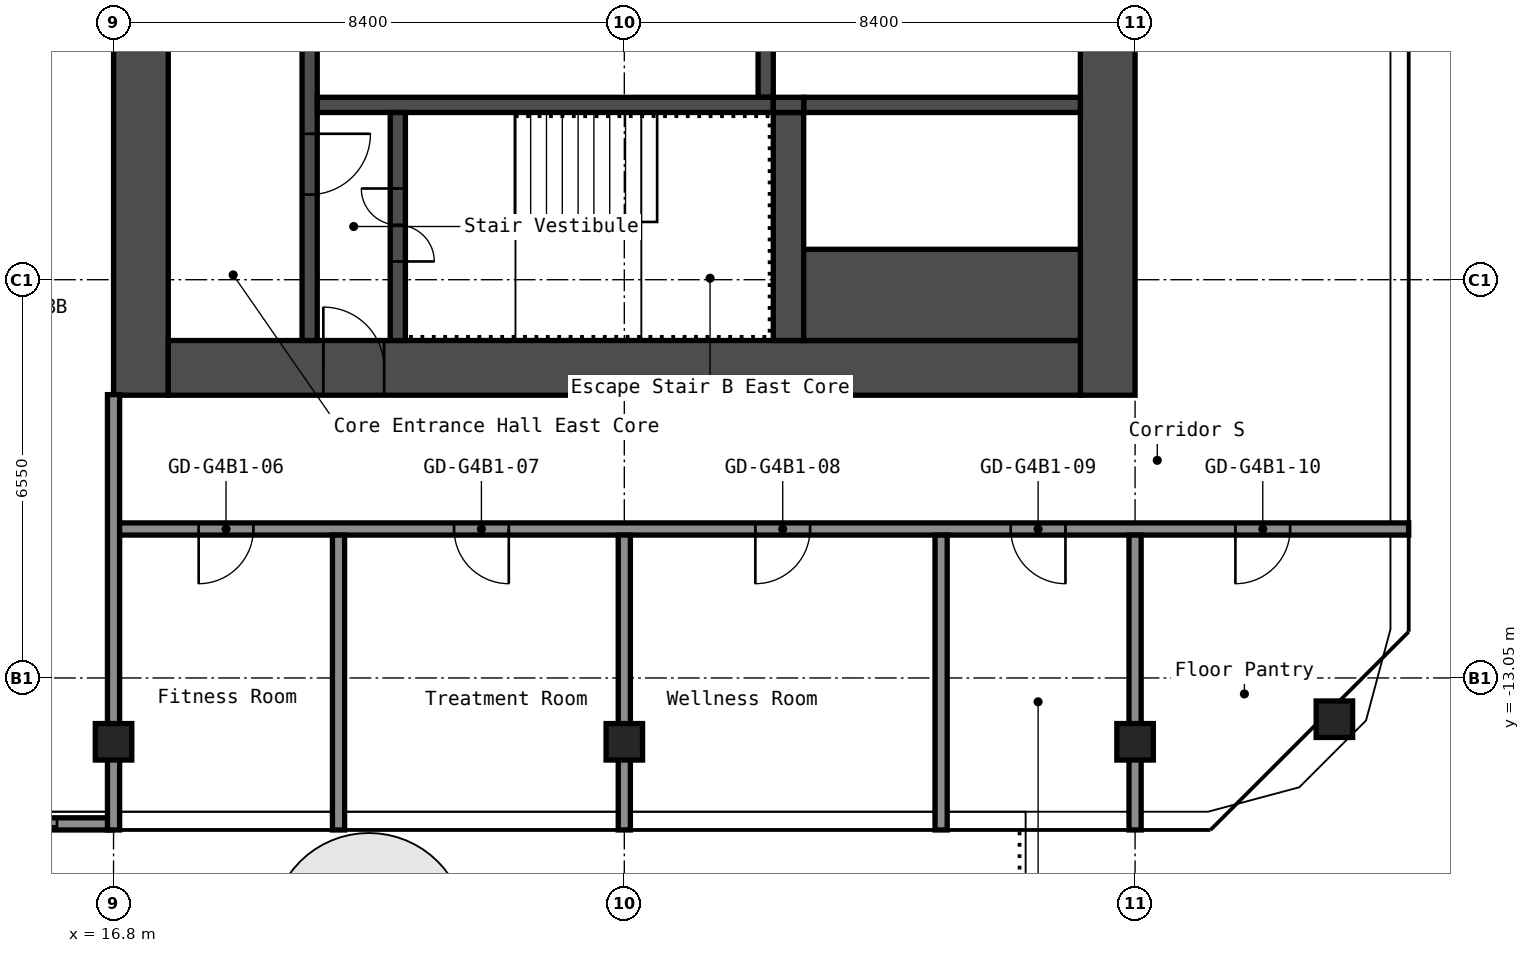
"""IFC4 building model, lengths in metres.
Left out: names, types, materials, properties, quantities, classifications, styles, units other than length and angle.
Written with IfcOpenShell. Run it as: python <this file> out.ifc"""

import sys

from ifc_helpers import new_model, si_unit, direction, frame, frame_2d, origin, origin_2d, place, context, subcontext, project, spatial, rectangle, hollow_rectangle, extrude, element, fill, save


model = new_model("IFC4")
c1 = context("Model", 3, precision=1e-05, world=origin(), true_north=direction((0.0, 1.0)))
c2 = subcontext(c1, "Body", "Model", "MODEL_VIEW")
j1 = project(units=[si_unit("LENGTHUNIT", "METRE"), si_unit("PLANEANGLEUNIT", "RADIAN")], contexts=[c1])
p1 = place(None, origin())
s1 = spatial("IfcSite", under=j1, at=p1, CompositionType="ELEMENT")
p2 = place(p1, origin())
s2 = spatial("IfcBuilding", under=s1, at=p2, CompositionType="ELEMENT")
p3 = place(p2, frame((0.0, 0.0, 205.8)))
s3 = spatial("IfcBuildingStorey", under=s2, at=p3, CompositionType="ELEMENT", Elevation=205.8)
for number, where, z_axis, x_axis in (
    (1, (16.8, -14.1, 0.0), (0.0, 0.0, 1.0), (1.0, 0.0, 0.0)),
    (2, (25.2, -14.1, 0.0), (0.0, 0.0, 1.0), (1.0, 0.0, 0.0)),
    (3, (33.6, -14.1, 0.0), (0.0, 0.0, 1.0), (1.0, 0.0, 0.0)),
    (4, (36.878, -13.729, 0.0), (0.0, 0.0, 1.0), (1.0, 0.0, 0.0)),
):
    element("IfcColumn", number, at=place(p3, frame(where, z_axis=z_axis, x_axis=x_axis)), inside=s3, PredefinedType="COLUMN", context=c2, shape_type="SweptSolid", body=[
        extrude(hollow_rectangle(XDim=0.6, YDim=0.6, WallThickness=0.025, InnerFilletRadius=0.038, OuterFilletRadius=0.062, at=origin_2d()), origin(), (0.0, 0.0, 1.0), 2.75),
    ])
p4 = place(p3, frame((17.25, -8.4, 0.0), z_axis=(0.0, 0.0, 1.0), x_axis=(0.0, 1.0, 0.0)))
e5 = element("IfcWall", 5, at=p4, inside=s3, PredefinedType="SHEAR", context=c2, shape_type="SweptSolid", body=[
    extrude(rectangle(XDim=16.8, YDim=0.9, at=frame_2d((8.4, 0.0))), origin(), (0.0, 0.0, 1.0), 2.75),
])
p5 = place(p4, frame((10.1, 0.0, 0.0)))
e6 = element("IfcOpeningElement", 6, at=p5, cuts=e5, PredefinedType="OPENING", context=c2, shape_type="SweptSolid", body=[
    extrude(rectangle(XDim=1.6, YDim=2.1, at=frame_2d((0.8, 1.05))), frame((0.0, 0.46, 0.0), z_axis=(0.0, -1.0, 0.0), x_axis=(1.0, 0.0, 0.0)), (0.0, 0.0, 1.0), 0.92),
])
p6 = place(p3, frame((33.15, -8.4, 0.0), z_axis=(0.0, 0.0, 1.0), x_axis=(0.0, 1.0, 0.0)))
e7 = element("IfcWall", 7, at=p6, inside=s3, PredefinedType="SHEAR", context=c2, shape_type="SweptSolid", body=[
    extrude(rectangle(XDim=16.8, YDim=0.9, at=frame_2d((8.4, 0.0))), origin(), (0.0, 0.0, 1.0), 2.75),
])
p7 = place(p3, frame((17.7, -7.95, 0.0), z_axis=(0.0, 0.0, 1.0), x_axis=(1.0, 0.0, 0.0)))
e8 = element("IfcWall", 8, at=p7, inside=s3, PredefinedType="SHEAR", context=c2, shape_type="SweptSolid", body=[
    extrude(rectangle(XDim=15.0, YDim=0.9, at=frame_2d((7.5, 0.0))), origin(), (0.0, 0.0, 1.0), 2.75),
])
p8 = place(p7, frame((2.55, 0.0, 0.0)))
e9 = element("IfcOpeningElement", 9, at=p8, cuts=e8, PredefinedType="OPENING", context=c2, shape_type="SweptSolid", body=[
    extrude(rectangle(XDim=1.0, YDim=2.1, at=frame_2d((0.5, 1.05))), frame((0.0, 0.46, 0.0), z_axis=(0.0, -1.0, 0.0), x_axis=(1.0, 0.0, 0.0)), (0.0, 0.0, 1.0), 0.92),
])
p9 = place(p3, frame((20.025, -7.5, 0.0), z_axis=(0.0, 0.0, 1.0), x_axis=(0.0, 1.0, 0.0)))
e10 = element("IfcWall", 10, at=p9, inside=s3, PredefinedType="SHEAR", context=c2, shape_type="SweptSolid", body=[
    extrude(rectangle(XDim=6.3, YDim=0.25, at=frame_2d((3.15, 0.0))), origin(), (0.0, 0.0, 1.0), 2.75),
])
p10 = place(p9, frame((2.4, 0.0, 0.0)))
e11 = element("IfcOpeningElement", 11, at=p10, cuts=e10, PredefinedType="OPENING", context=c2, shape_type="SweptSolid", body=[
    extrude(rectangle(XDim=1.0, YDim=2.1, at=frame_2d((0.5, 1.05))), frame((0.0, 0.135, 0.0), z_axis=(0.0, -1.0, 0.0), x_axis=(1.0, 0.0, 0.0)), (0.0, 0.0, 1.0), 0.27),
])
p11 = place(p3, frame((27.525, -3.5, 0.0), z_axis=(0.0, 0.0, 1.0), x_axis=(0.0, 1.0, 0.0)))
e12 = element("IfcWall", 12, at=p11, inside=s3, PredefinedType="SHEAR", context=c2, shape_type="SweptSolid", body=[
    extrude(rectangle(XDim=2.05, YDim=0.25, at=frame_2d((1.025, 0.0))), origin(), (0.0, 0.0, 1.0), 2.75),
])
p12 = place(p3, frame((20.15, -3.625, 0.0), z_axis=(0.0, 0.0, 1.0), x_axis=(1.0, 0.0, 0.0)))
e13 = element("IfcWall", 13, at=p12, inside=s3, PredefinedType="SHEAR", context=c2, shape_type="SweptSolid", body=[
    extrude(rectangle(XDim=7.5, YDim=0.25, at=frame_2d((3.75, 0.0))), origin(), (0.0, 0.0, 1.0), 2.75),
])
p13 = place(p3, frame((21.475, -7.5, 0.0), z_axis=(0.0, 0.0, 1.0), x_axis=(0.0, 1.0, 0.0)))
e14 = element("IfcWall", 14, at=p13, inside=s3, PredefinedType="SHEAR", context=c2, shape_type="SweptSolid", body=[
    extrude(rectangle(XDim=3.75, YDim=0.25, at=frame_2d((1.875, 0.0))), origin(), (0.0, 0.0, 1.0), 2.75),
])
p14 = place(p13, frame((1.3, 0.0, 0.0)))
e15 = element("IfcOpeningElement", 15, at=p14, cuts=e14, PredefinedType="OPENING", context=c2, shape_type="SweptSolid", body=[
    extrude(rectangle(XDim=1.2, YDim=2.1, at=frame_2d((0.6, 1.05))), frame((0.0, 0.135, 0.0), z_axis=(0.0, -1.0, 0.0), x_axis=(1.0, 0.0, 0.0)), (0.0, 0.0, 1.0), 0.27),
])
p15 = place(p3, frame((27.9, -7.5, 0.0), z_axis=(0.0, 0.0, 1.0), x_axis=(0.0, 1.0, 0.0)))
e16 = element("IfcWall", 16, at=p15, inside=s3, PredefinedType="SHEAR", context=c2, shape_type="SweptSolid", body=[
    extrude(rectangle(XDim=3.75, YDim=0.5, at=frame_2d((1.875, 0.0))), origin(), (0.0, 0.0, 1.0), 2.75),
])
p16 = place(p3, frame((28.15, -3.625, 0.0), z_axis=(0.0, 0.0, 1.0), x_axis=(1.0, 0.0, 0.0)))
e17 = element("IfcWall", 17, at=p16, inside=s3, PredefinedType="SHEAR", context=c2, shape_type="SweptSolid", body=[
    extrude(rectangle(XDim=4.55, YDim=0.25, at=frame_2d((2.275, 0.0))), origin(), (0.0, 0.0, 1.0), 2.75),
])
p17 = place(p3, frame((28.15, -6.75, 0.0), z_axis=(0.0, 0.0, 1.0), x_axis=(1.0, 0.0, 0.0)))
e18 = element("IfcWall", 18, at=p17, inside=s3, PredefinedType="SHEAR", context=c2, shape_type="SweptSolid", body=[
    extrude(rectangle(XDim=4.55, YDim=1.5, at=frame_2d((2.275, 0.0))), origin(), (0.0, 0.0, 1.0), 2.75),
])
p18 = place(p3, frame((27.65, -3.625, 0.0), z_axis=(0.0, 0.0, 1.0), x_axis=(1.0, 0.0, 0.0)))
e19 = element("IfcWall", 19, at=p18, inside=s3, PredefinedType="SHEAR", context=c2, shape_type="SweptSolid", body=[
    extrude(rectangle(XDim=0.5, YDim=0.25, at=frame_2d((0.25, 0.0))), origin(), (0.0, 0.0, 1.0), 2.75),
])
p19 = place(p3, frame((16.8, -10.6, 0.0), z_axis=(0.0, 0.0, 1.0), x_axis=(1.0, 0.0, 0.0)))
e20 = element("IfcWall", 20, at=p19, inside=s3, PredefinedType="PARTITIONING", context=c2, shape_type="SweptSolid", body=[
    extrude(rectangle(XDim=21.3, YDim=0.2, at=frame_2d((10.65, 0.0))), origin(), (0.0, 0.0, 1.0), 2.75),
])
p20 = place(p19, frame((1.4, 0.0, 0.0)))
e21 = element("IfcOpeningElement", 21, at=p20, cuts=e20, PredefinedType="OPENING", context=c2, shape_type="SweptSolid", body=[
    extrude(rectangle(XDim=0.9, YDim=2.1, at=frame_2d((0.45, 1.05))), frame((0.0, 0.11, 0.0), z_axis=(0.0, -1.0, 0.0), x_axis=(1.0, 0.0, 0.0)), (0.0, 0.0, 1.0), 0.22),
])
p21 = place(p19, frame((5.6, 0.0, 0.0)))
e22 = element("IfcOpeningElement", 22, at=p21, cuts=e20, PredefinedType="OPENING", context=c2, shape_type="SweptSolid", body=[
    extrude(rectangle(XDim=0.9, YDim=2.1, at=frame_2d((0.45, 1.05))), frame((0.0, 0.11, 0.0), z_axis=(0.0, -1.0, 0.0), x_axis=(1.0, 0.0, 0.0)), (0.0, 0.0, 1.0), 0.22),
])
p22 = place(p19, frame((10.555, 0.0, 0.0)))
e23 = element("IfcOpeningElement", 23, at=p22, cuts=e20, PredefinedType="OPENING", context=c2, shape_type="SweptSolid", body=[
    extrude(rectangle(XDim=0.9, YDim=2.1, at=frame_2d((0.45, 1.05))), frame((0.0, 0.11, 0.0), z_axis=(0.0, -1.0, 0.0), x_axis=(1.0, 0.0, 0.0)), (0.0, 0.0, 1.0), 0.22),
])
p23 = place(p19, frame((14.755, 0.0, 0.0)))
e24 = element("IfcOpeningElement", 24, at=p23, cuts=e20, PredefinedType="OPENING", context=c2, shape_type="SweptSolid", body=[
    extrude(rectangle(XDim=0.9, YDim=2.1, at=frame_2d((0.45, 1.05))), frame((0.0, 0.11, 0.0), z_axis=(0.0, -1.0, 0.0), x_axis=(1.0, 0.0, 0.0)), (0.0, 0.0, 1.0), 0.22),
])
p24 = place(p19, frame((18.45, 0.0, 0.0)))
e25 = element("IfcOpeningElement", 25, at=p24, cuts=e20, PredefinedType="OPENING", context=c2, shape_type="SweptSolid", body=[
    extrude(rectangle(XDim=0.9, YDim=2.1, at=frame_2d((0.45, 1.05))), frame((0.0, 0.11, 0.0), z_axis=(0.0, -1.0, 0.0), x_axis=(1.0, 0.0, 0.0)), (0.0, 0.0, 1.0), 0.22),
])
p25 = place(p3, frame((16.8, -15.55, 0.0), z_axis=(0.0, 0.0, 1.0), x_axis=(0.0, 1.0, 0.0)))
e26 = element("IfcWall", 26, at=p25, inside=s3, PredefinedType="PARTITIONING", context=c2, shape_type="SweptSolid", body=[
    extrude(rectangle(XDim=7.16, YDim=0.2, at=frame_2d((3.58, 0.0))), origin(), (0.0, 0.0, 1.0), 2.75),
])
for number, where, z_axis, x_axis in (
    (27, (20.5, -15.55, 0.0), (0.0, 0.0, 1.0), (0.0, 1.0, 0.0)),
    (28, (25.2, -15.55, 0.0), (0.0, 0.0, 1.0), (0.0, 1.0, 0.0)),
    (29, (30.41, -15.55, 0.0), (0.0, 0.0, 1.0), (0.0, 1.0, 0.0)),
    (30, (33.6, -15.55, 0.0), (0.0, 0.0, 1.0), (0.0, 1.0, 0.0)),
):
    element("IfcWall", number, at=place(p3, frame(where, z_axis=z_axis, x_axis=x_axis)), inside=s3, PredefinedType="PARTITIONING", context=c2, shape_type="SweptSolid", body=[
        extrude(rectangle(XDim=4.85, YDim=0.2, at=frame_2d((2.425, 0.0))), origin(), (0.0, 0.0, 1.0), 2.75),
    ])
p26 = place(p3, frame((12.56, -15.45, 0.0), z_axis=(0.0, 0.0, 1.0), x_axis=(1.0, 0.0, 0.0)))
p27 = place(p26, frame((0.91, 0.0, 0.0)))
p28 = place(p27, frame((2.4, 0.0, 0.0), z_axis=(0.0, 0.0, 1.0), x_axis=(-1.0, 0.0, 0.0)))
e31 = element("IfcDoor", 31, at=p28, inside=s3, OperationType="SLIDING_TO_LEFT", PredefinedType="DOOR", context=c2, shape_type="SweptSolid", body=[
    extrude(rectangle(XDim=2.4, YDim=2.2, at=frame_2d((1.2, 1.1))), frame((0.0, 0.025, 0.0), z_axis=(0.0, -1.0, 0.0), x_axis=(1.0, 0.0, 0.0)), (0.0, 0.0, 1.0), 0.05),
])
p29 = place(p8, origin())
e32 = element("IfcDoor", 32, at=p29, inside=s3, OperationType="SINGLE_SWING_RIGHT", PredefinedType="DOOR", context=c2, shape_type="SweptSolid", body=[
    extrude(rectangle(XDim=1.0, YDim=2.1, at=frame_2d((0.5, 1.05))), frame((0.0, 0.025, 0.0), z_axis=(0.0, -1.0, 0.0), x_axis=(1.0, 0.0, 0.0)), (0.0, 0.0, 1.0), 0.05),
])
fill(e9, e32)
p30 = place(p14, origin())
e33 = element("IfcDoor", 33, at=p30, inside=s3, OperationType="DOUBLE_DOOR_SINGLE_SWING", PredefinedType="DOOR", context=c2, shape_type="SweptSolid", body=[
    extrude(rectangle(XDim=1.2, YDim=2.1, at=frame_2d((0.6, 1.05))), frame((0.0, 0.025, 0.0), z_axis=(0.0, -1.0, 0.0), x_axis=(1.0, 0.0, 0.0)), (0.0, 0.0, 1.0), 0.05),
])
fill(e15, e33)
p31 = place(p10, origin())
e34 = element("IfcDoor", 34, at=p31, inside=s3, OperationType="SINGLE_SWING_RIGHT", PredefinedType="DOOR", context=c2, shape_type="SweptSolid", body=[
    extrude(rectangle(XDim=1.0, YDim=2.1, at=frame_2d((0.5, 1.05))), frame((0.0, 0.025, 0.0), z_axis=(0.0, -1.0, 0.0), x_axis=(1.0, 0.0, 0.0)), (0.0, 0.0, 1.0), 0.05),
])
fill(e11, e34)
p32 = place(p20, origin())
e35 = element("IfcDoor", 35, at=p32, inside=s3, OperationType="SINGLE_SWING_LEFT", PredefinedType="DOOR", context=c2, shape_type="SweptSolid", body=[
    extrude(rectangle(XDim=0.9, YDim=2.1, at=frame_2d((0.45, 1.05))), frame((0.0, 0.025, 0.0), z_axis=(0.0, -1.0, 0.0), x_axis=(1.0, 0.0, 0.0)), (0.0, 0.0, 1.0), 0.05),
])
fill(e21, e35)
p33 = place(p21, origin())
e36 = element("IfcDoor", 36, at=p33, inside=s3, OperationType="SINGLE_SWING_RIGHT", PredefinedType="DOOR", context=c2, shape_type="SweptSolid", body=[
    extrude(rectangle(XDim=0.9, YDim=2.1, at=frame_2d((0.45, 1.05))), frame((0.0, 0.025, 0.0), z_axis=(0.0, -1.0, 0.0), x_axis=(1.0, 0.0, 0.0)), (0.0, 0.0, 1.0), 0.05),
])
fill(e22, e36)
p34 = place(p22, origin())
e37 = element("IfcDoor", 37, at=p34, inside=s3, OperationType="SINGLE_SWING_LEFT", PredefinedType="DOOR", context=c2, shape_type="SweptSolid", body=[
    extrude(rectangle(XDim=0.9, YDim=2.1, at=frame_2d((0.45, 1.05))), frame((0.0, 0.025, 0.0), z_axis=(0.0, -1.0, 0.0), x_axis=(1.0, 0.0, 0.0)), (0.0, 0.0, 1.0), 0.05),
])
fill(e23, e37)
p35 = place(p23, origin())
e38 = element("IfcDoor", 38, at=p35, inside=s3, OperationType="SINGLE_SWING_RIGHT", PredefinedType="DOOR", context=c2, shape_type="SweptSolid", body=[
    extrude(rectangle(XDim=0.9, YDim=2.1, at=frame_2d((0.45, 1.05))), frame((0.0, 0.025, 0.0), z_axis=(0.0, -1.0, 0.0), x_axis=(1.0, 0.0, 0.0)), (0.0, 0.0, 1.0), 0.05),
])
fill(e24, e38)
p36 = place(p24, origin())
e39 = element("IfcDoor", 39, at=p36, inside=s3, OperationType="SINGLE_SWING_LEFT", PredefinedType="DOOR", context=c2, shape_type="SweptSolid", body=[
    extrude(rectangle(XDim=0.9, YDim=2.1, at=frame_2d((0.45, 1.05))), frame((0.0, 0.025, 0.0), z_axis=(0.0, -1.0, 0.0), x_axis=(1.0, 0.0, 0.0)), (0.0, 0.0, 1.0), 0.05),
])
fill(e25, e39)
save(model, sys.argv[1])
